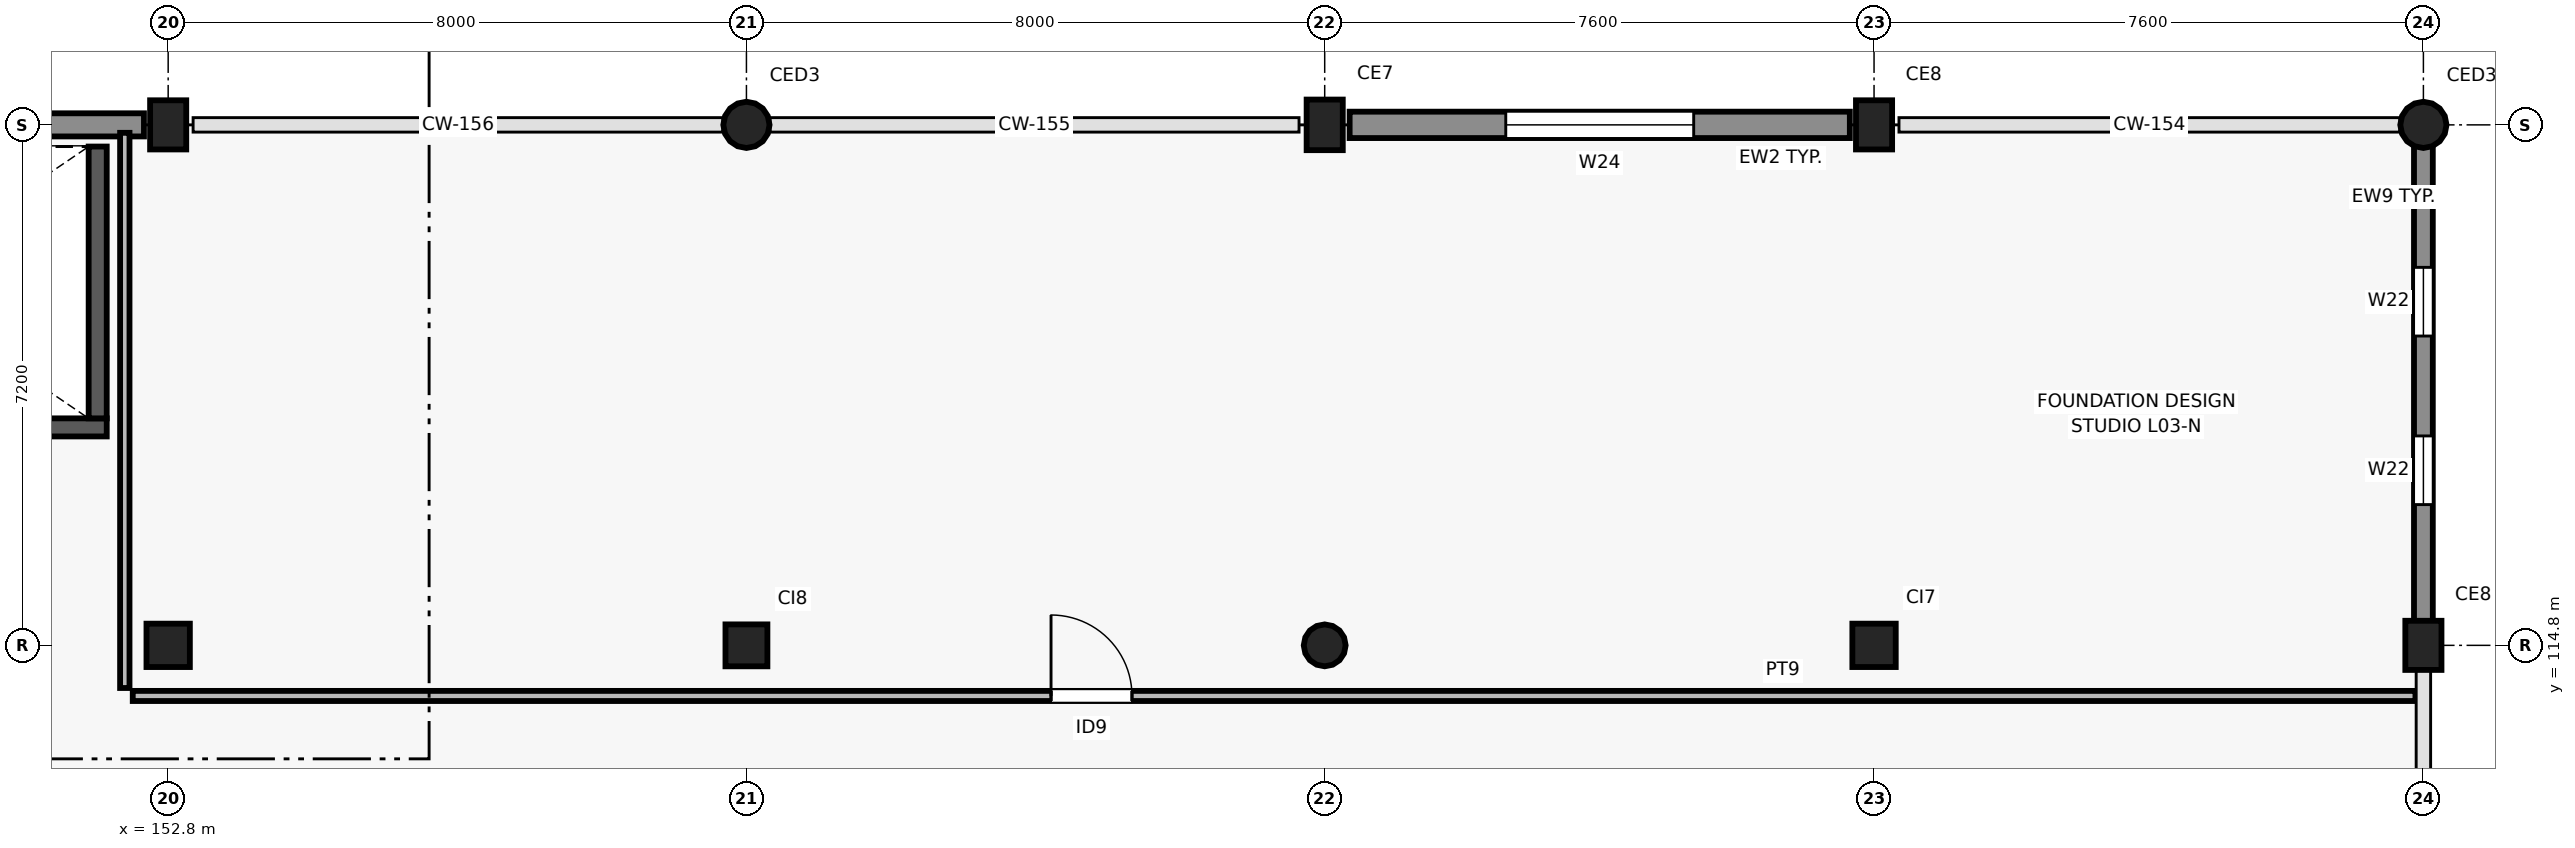
"""IFC4 building model, lengths in metres.
Left out: names, types, materials, properties, quantities, classifications, styles, units other than length and angle.
Written with IfcOpenShell. Run it as: python <this file> out.ifc"""

import sys

from ifc_helpers import new_model, si_unit, direction, frame, frame_2d, origin, origin_2d, place, context, subcontext, project, spatial, rectangle, circle, extrude, element, fill, save


model = new_model("IFC4")
c1 = context("Model", 3, precision=1e-05, world=origin(), true_north=direction((0.0, 1.0)))
c2 = subcontext(c1, "Body", "Model", "MODEL_VIEW")
j1 = project(units=[si_unit("LENGTHUNIT", "METRE"), si_unit("PLANEANGLEUNIT", "RADIAN")], contexts=[c1])
p1 = place(None, origin())
s1 = spatial("IfcSite", under=j1, at=p1, CompositionType="ELEMENT")
p2 = place(p1, origin())
s2 = spatial("IfcBuilding", under=s1, at=p2, CompositionType="ELEMENT")
p3 = place(p2, frame((0.0, 0.0, 13.2)))
s3 = spatial("IfcBuildingStorey", under=s2, at=p3, CompositionType="ELEMENT", Elevation=13.2)
p4 = place(p3, frame((152.8, 114.8, 0.0), z_axis=(0.0, 0.0, 1.0), x_axis=(1.0, 0.0, 0.0)))
e1 = element("IfcColumn", 1, at=p4, inside=s3, PredefinedType="COLUMN", context=c2, shape_type="SweptSolid", body=[
    extrude(rectangle(XDim=0.6, YDim=0.6, at=origin_2d()), origin(), (0.0, 0.0, 1.0), 4.2),
])
p5 = place(p3, frame((152.8, 122.0, 0.0), z_axis=(0.0, 0.0, 1.0), x_axis=(1.0, 0.0, 0.0)))
e2 = element("IfcColumn", 2, at=p5, inside=s3, PredefinedType="COLUMN", context=c2, shape_type="SweptSolid", body=[
    extrude(rectangle(XDim=0.68, YDim=0.5, at=origin_2d()), origin(), (0.0, 0.0, 1.0), 4.2),
])
p6 = place(p3, frame((160.8, 114.8, 0.0), z_axis=(0.0, 0.0, 1.0), x_axis=(1.0, 0.0, 0.0)))
e3 = element("IfcColumn", 3, at=p6, inside=s3, PredefinedType="COLUMN", context=c2, shape_type="SweptSolid", body=[
    extrude(rectangle(XDim=0.58, YDim=0.58, at=origin_2d()), origin(), (0.0, 0.0, 1.0), 4.2),
])
p7 = place(p3, frame((160.8, 122.0, 0.0), z_axis=(0.0, 0.0, 1.0), x_axis=(1.0, 0.0, 0.0)))
e4 = element("IfcColumn", 4, at=p7, inside=s3, PredefinedType="COLUMN", context=c2, shape_type="SweptSolid", body=[
    extrude(circle(Radius=0.32, at=origin_2d()), origin(), (0.0, 0.0, 1.0), 4.2),
])
p8 = place(p3, frame((168.8, 114.8, 0.0), z_axis=(0.0, 0.0, 1.0), x_axis=(1.0, 0.0, 0.0)))
e5 = element("IfcColumn", 5, at=p8, inside=s3, PredefinedType="COLUMN", context=c2, shape_type="SweptSolid", body=[
    extrude(circle(Radius=0.29, at=origin_2d()), origin(), (0.0, 0.0, 1.0), 4.2),
])
p9 = place(p3, frame((168.8, 122.0, 0.0), z_axis=(0.0, 0.0, 1.0), x_axis=(1.0, 0.0, 0.0)))
e6 = element("IfcColumn", 6, at=p9, inside=s3, PredefinedType="COLUMN", context=c2, shape_type="SweptSolid", body=[
    extrude(rectangle(XDim=0.7, YDim=0.5, at=origin_2d()), origin(), (0.0, 0.0, 1.0), 4.2),
])
p10 = place(p3, frame((176.4, 114.8, 0.0), z_axis=(0.0, 0.0, 1.0), x_axis=(1.0, 0.0, 0.0)))
e7 = element("IfcColumn", 7, at=p10, inside=s3, PredefinedType="COLUMN", context=c2, shape_type="SweptSolid", body=[
    extrude(rectangle(XDim=0.6, YDim=0.6, at=origin_2d()), origin(), (0.0, 0.0, 1.0), 4.2),
])
for number, where, z_axis, x_axis in (
    (8, (176.4, 122.0, 0.0), (0.0, 0.0, 1.0), (1.0, 0.0, 0.0)),
    (9, (184.0, 114.8, 0.0), (0.0, 0.0, 1.0), (1.0, 0.0, 0.0)),
):
    element("IfcColumn", number, at=place(p3, frame(where, z_axis=z_axis, x_axis=x_axis)), inside=s3, PredefinedType="COLUMN", context=c2, shape_type="SweptSolid", body=[
        extrude(rectangle(XDim=0.68, YDim=0.5, at=origin_2d()), origin(), (0.0, 0.0, 1.0), 4.2),
    ])
p11 = place(p3, frame((184.0, 122.0, 0.0), z_axis=(0.0, 0.0, 1.0), x_axis=(1.0, 0.0, 0.0)))
e10 = element("IfcColumn", 10, at=p11, inside=s3, PredefinedType="COLUMN", context=c2, shape_type="SweptSolid", body=[
    extrude(circle(Radius=0.32, at=origin_2d()), origin(), (0.0, 0.0, 1.0), 4.2),
])
p12 = place(p3, frame((184.0, 115.045, 0.0), z_axis=(0.0, 0.0, 1.0), x_axis=(0.0, 1.0, 0.0)))
e11 = element("IfcWall", 11, at=p12, inside=s3, PredefinedType="SOLIDWALL", context=c2, shape_type="SweptSolid", body=[
    extrude(rectangle(XDim=6.686, YDim=0.26, at=frame_2d((3.343, 0.0))), origin(), (0.0, 0.0, 1.0), 3.44),
])
p13 = place(p12, frame((1.702, 0.0, 0.9)))
e12 = element("IfcOpeningElement", 12, at=p13, cuts=e11, PredefinedType="OPENING", context=c2, shape_type="SweptSolid", body=[
    extrude(rectangle(XDim=0.95, YDim=1.25, at=frame_2d((0.475, 0.625))), frame((0.0, 0.14, 0.0), z_axis=(0.0, -1.0, 0.0), x_axis=(1.0, 0.0, 0.0)), (0.0, 0.0, 1.0), 0.28),
])
p14 = place(p12, frame((4.034, 0.0, 0.9)))
e13 = element("IfcOpeningElement", 13, at=p14, cuts=e11, PredefinedType="OPENING", context=c2, shape_type="SweptSolid", body=[
    extrude(rectangle(XDim=0.95, YDim=1.25, at=frame_2d((0.475, 0.625))), frame((0.0, 0.14, 0.0), z_axis=(0.0, -1.0, 0.0), x_axis=(1.0, 0.0, 0.0)), (0.0, 0.0, 1.0), 0.28),
])
p15 = place(p3, frame((176.065, 122.0, 0.0), z_axis=(0.0, 0.0, 1.0), x_axis=(-1.0, 0.0, 0.0)))
e14 = element("IfcWall", 14, at=p15, inside=s3, PredefinedType="SOLIDWALL", context=c2, shape_type="SweptSolid", body=[
    extrude(rectangle(XDim=6.92, YDim=0.365, at=frame_2d((3.46, 0.0))), origin(), (0.0, 0.0, 1.0), 3.36),
])
p16 = place(p15, frame((2.16, 0.0, 0.9)))
e15 = element("IfcOpeningElement", 15, at=p16, cuts=e14, PredefinedType="OPENING", context=c2, shape_type="SweptSolid", body=[
    extrude(rectangle(XDim=2.6, YDim=1.65, at=frame_2d((1.3, 0.825))), frame((0.0, 0.192, 0.0), z_axis=(0.0, -1.0, 0.0), x_axis=(1.0, 0.0, 0.0)), (0.0, 0.0, 1.0), 0.385),
])
p17 = place(p3, frame((152.465, 122.0, 0.0), z_axis=(0.0, 0.0, 1.0), x_axis=(-1.0, 0.0, 0.0)))
e16 = element("IfcWall", 16, at=p17, inside=s3, PredefinedType="SOLIDWALL", context=c2, shape_type="SweptSolid", body=[
    extrude(rectangle(XDim=7.32, YDim=0.32, at=frame_2d((3.66, 0.0))), origin(), (0.0, 0.0, 1.0), 3.92),
])
p18 = place(p3, frame((144.05, 117.815, 0.0), z_axis=(0.0, 0.0, 1.0), x_axis=(1.0, 0.0, 0.0)))
e17 = element("IfcWall", 17, at=p18, inside=s3, PredefinedType="SHEAR", context=c2, shape_type="SweptSolid", body=[
    extrude(rectangle(XDim=7.9, YDim=0.25, at=frame_2d((3.95, 0.0))), origin(), (0.0, 0.0, 1.0), 3.92),
])
p19 = place(p18, frame((0.5, 0.0, 0.0)))
e18 = element("IfcOpeningElement", 18, at=p19, cuts=e17, PredefinedType="OPENING", context=c2, shape_type="SweptSolid", body=[
    extrude(rectangle(XDim=1.25, YDim=2.2, at=frame_2d((0.625, 1.1))), frame((0.0, 0.135, 0.0), z_axis=(0.0, -1.0, 0.0), x_axis=(1.0, 0.0, 0.0)), (0.0, 0.0, 1.0), 0.27),
])
p20 = place(p3, frame((151.825, 117.94, 0.0), z_axis=(0.0, 0.0, 1.0), x_axis=(0.0, 1.0, 0.0)))
e19 = element("IfcWall", 19, at=p20, inside=s3, PredefinedType="SHEAR", context=c2, shape_type="SweptSolid", body=[
    extrude(rectangle(XDim=3.76, YDim=0.25, at=frame_2d((1.88, 0.0))), origin(), (0.0, 0.0, 1.0), 3.92),
])
p21 = place(p3, frame((152.31, 114.1, 0.0), z_axis=(0.0, 0.0, 1.0), x_axis=(1.0, 0.0, 0.0)))
e20 = element("IfcWall", 20, at=p21, inside=s3, PredefinedType="PARTITIONING", context=c2, shape_type="SweptSolid", body=[
    extrude(rectangle(XDim=31.58, YDim=0.14, at=frame_2d((15.79, 0.0))), origin(), (0.0, 0.0, 1.0), 3.9),
])
p22 = place(p21, frame((12.704, 0.0, 0.0)))
e21 = element("IfcOpeningElement", 21, at=p22, cuts=e20, PredefinedType="OPENING", context=c2, shape_type="SweptSolid", body=[
    extrude(rectangle(XDim=1.12, YDim=2.2, at=frame_2d((0.56, 1.1))), frame((0.0, 0.08, 0.0), z_axis=(0.0, -1.0, 0.0), x_axis=(1.0, 0.0, 0.0)), (0.0, 0.0, 1.0), 0.16),
])
p23 = place(p3, frame((152.2, 114.21, 0.0), z_axis=(0.0, 0.0, 1.0), x_axis=(0.0, 1.0, 0.0)))
e22 = element("IfcWall", 22, at=p23, inside=s3, PredefinedType="PARTITIONING", context=c2, shape_type="SweptSolid", body=[
    extrude(rectangle(XDim=7.68, YDim=0.13, at=frame_2d((3.84, 0.0))), origin(), (0.0, 0.0, 1.0), 3.9),
])
p24 = place(p13, origin())
e23 = element("IfcWindow", 23, at=p24, inside=s3, PartitioningType="SINGLE_PANEL", PredefinedType="WINDOW", context=c2, shape_type="SweptSolid", body=[
    extrude(rectangle(XDim=0.95, YDim=1.25, at=frame_2d((0.475, 0.625))), frame((0.0, 0.03, 0.0), z_axis=(0.0, -1.0, 0.0), x_axis=(1.0, 0.0, 0.0)), (0.0, 0.0, 1.0), 0.06),
])
fill(e12, e23)
p25 = place(p14, origin())
e24 = element("IfcWindow", 24, at=p25, inside=s3, PartitioningType="SINGLE_PANEL", PredefinedType="WINDOW", context=c2, shape_type="SweptSolid", body=[
    extrude(rectangle(XDim=0.95, YDim=1.25, at=frame_2d((0.475, 0.625))), frame((0.0, 0.03, 0.0), z_axis=(0.0, -1.0, 0.0), x_axis=(1.0, 0.0, 0.0)), (0.0, 0.0, 1.0), 0.06),
])
fill(e13, e24)
p26 = place(p16, origin())
e25 = element("IfcWindow", 25, at=p26, inside=s3, PartitioningType="SINGLE_PANEL", PredefinedType="WINDOW", context=c2, shape_type="SweptSolid", body=[
    extrude(rectangle(XDim=2.6, YDim=1.65, at=frame_2d((1.3, 0.825))), frame((0.0, 0.03, 0.0), z_axis=(0.0, -1.0, 0.0), x_axis=(1.0, 0.0, 0.0)), (0.0, 0.0, 1.0), 0.06),
])
fill(e15, e25)
p27 = place(p22, origin())
e26 = element("IfcDoor", 26, at=p27, inside=s3, OperationType="SINGLE_SWING_LEFT", PredefinedType="DOOR", context=c2, shape_type="SweptSolid", body=[
    extrude(rectangle(XDim=1.12, YDim=2.2, at=frame_2d((0.56, 1.1))), frame((0.0, 0.025, 0.0), z_axis=(0.0, -1.0, 0.0), x_axis=(1.0, 0.0, 0.0)), (0.0, 0.0, 1.0), 0.05),
])
fill(e21, e26)
save(model, sys.argv[1])
